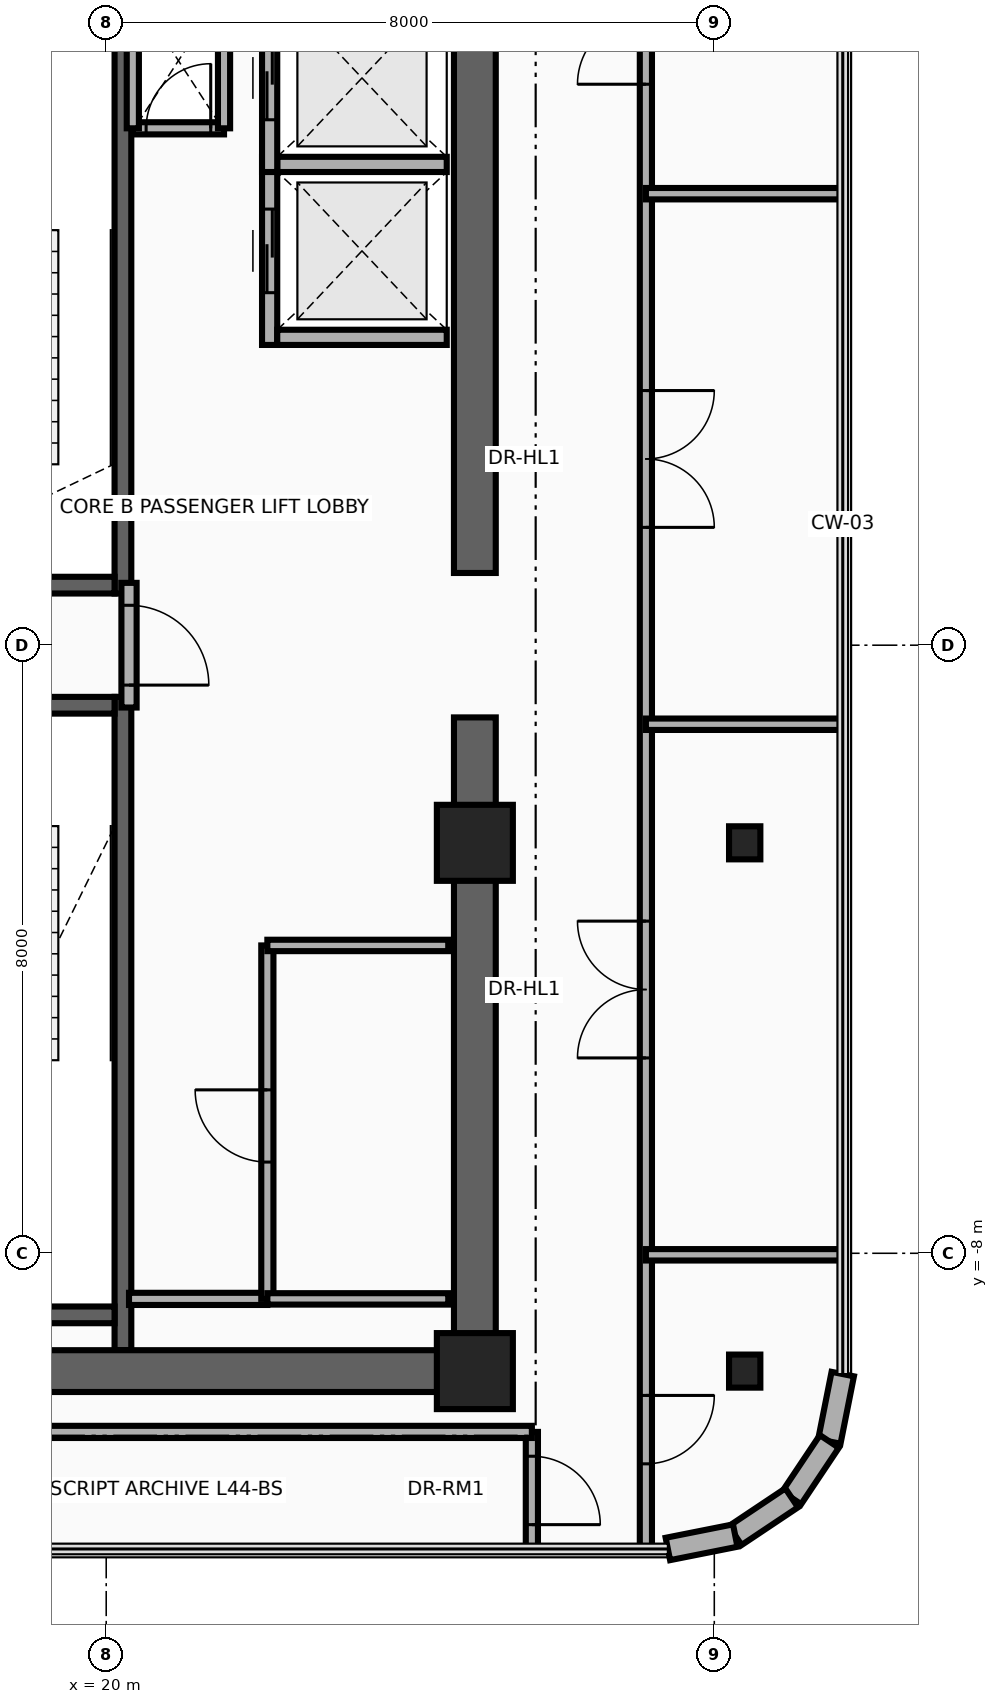
"""IFC4 building model, lengths in metres.
Left out: names, types, materials, properties, quantities, classifications, styles, units other than length and angle.
Written with IfcOpenShell. Run it as: python <this file> out.ifc"""

import sys

from ifc_helpers import new_model, si_unit, direction, frame, frame_2d, origin, origin_2d, place, context, subcontext, project, spatial, rectangle, i_section, extrude, source, transform, mapped, element, fill, save


model = new_model("IFC4")
c1 = context("Model", 3, precision=1e-05, world=origin(), true_north=direction((0.0, 1.0)))
c2 = subcontext(c1, "Body", "Model", "MODEL_VIEW")
j1 = project(units=[si_unit("LENGTHUNIT", "METRE"), si_unit("PLANEANGLEUNIT", "RADIAN")], contexts=[c1])
p1 = place(None, origin())
s1 = spatial("IfcSite", under=j1, at=p1, CompositionType="ELEMENT")
p2 = place(p1, origin())
s2 = spatial("IfcBuilding", under=s1, at=p2, CompositionType="ELEMENT")
p3 = place(p2, frame((0.0, 0.0, 172.3)))
s3 = spatial("IfcBuildingStorey", under=s2, at=p3, CompositionType="ELEMENT", Elevation=172.3)
p4 = place(p3, frame((20.22, 0.68, 0.0), z_axis=(0.0, 0.0, 1.0), x_axis=(0.0, 1.0, 0.0)))
e1 = element("IfcWall", 1, at=p4, inside=s3, PredefinedType="SHEAR", context=c2, shape_type="SweptSolid", body=[
    extrude(rectangle(XDim=8.595, YDim=0.22, at=frame_2d((4.297, 0.0))), origin(), (0.0, 0.0, 1.0), 3.93),
])
p5 = place(p3, frame((17.0, 0.79, 0.0), z_axis=(0.0, 0.0, 1.0), x_axis=(1.0, 0.0, 0.0)))
e2 = element("IfcWall", 2, at=p5, inside=s3, PredefinedType="SHEAR", context=c2, shape_type="SweptSolid", body=[
    extrude(rectangle(XDim=3.11, YDim=0.22, at=frame_2d((1.555, 0.0))), origin(), (0.0, 0.0, 1.0), 3.93),
])
p6 = place(p5, frame((0.95, 0.0, 0.0)))
e3 = element("IfcOpeningElement", 3, at=p6, cuts=e2, PredefinedType="OPENING", context=c2, shape_type="SweptSolid", body=[
    extrude(rectangle(XDim=1.1, YDim=2.15, at=frame_2d((0.55, 1.075))), frame((0.0, 0.125, 0.0), z_axis=(0.0, -1.0, 0.0), x_axis=(1.0, 0.0, 0.0)), (0.0, 0.0, 1.0), 0.25),
])
p7 = place(p3, frame((20.22, -9.275, 0.0), z_axis=(0.0, 0.0, 1.0), x_axis=(0.0, 1.0, 0.0)))
e4 = element("IfcWall", 4, at=p7, inside=s3, PredefinedType="SHEAR", context=c2, shape_type="SweptSolid", body=[
    extrude(rectangle(XDim=8.595, YDim=0.22, at=frame_2d((4.297, 0.0))), origin(), (0.0, 0.0, 1.0), 3.93),
])
p8 = place(p3, frame((17.0, -8.81, 0.0), z_axis=(0.0, 0.0, 1.0), x_axis=(1.0, 0.0, 0.0)))
e5 = element("IfcWall", 5, at=p8, inside=s3, PredefinedType="SHEAR", context=c2, shape_type="SweptSolid", body=[
    extrude(rectangle(XDim=3.11, YDim=0.22, at=frame_2d((1.555, 0.0))), origin(), (0.0, 0.0, 1.0), 3.93),
])
p9 = place(p3, frame((17.0, -0.79, 0.0), z_axis=(0.0, 0.0, 1.0), x_axis=(1.0, 0.0, 0.0)))
e6 = element("IfcWall", 6, at=p9, inside=s3, PredefinedType="SHEAR", context=c2, shape_type="SweptSolid", body=[
    extrude(rectangle(XDim=3.11, YDim=0.22, at=frame_2d((1.555, 0.0))), origin(), (0.0, 0.0, 1.0), 3.93),
])
p10 = place(p9, frame((0.95, 0.0, 0.0)))
e7 = element("IfcOpeningElement", 7, at=p10, cuts=e6, PredefinedType="OPENING", context=c2, shape_type="SweptSolid", body=[
    extrude(rectangle(XDim=1.1, YDim=2.15, at=frame_2d((0.55, 1.075))), frame((0.0, 0.125, 0.0), z_axis=(0.0, -1.0, 0.0), x_axis=(1.0, 0.0, 0.0)), (0.0, 0.0, 1.0), 0.25),
])
for number, where, z_axis, x_axis in (
    (8, (24.85, -9.825, 0.0), (0.0, 0.0, 1.0), (0.0, 1.0, 0.0)),
    (9, (24.85, 0.95, 0.0), (0.0, 0.0, 1.0), (0.0, 1.0, 0.0)),
):
    element("IfcWall", number, at=place(p3, frame(where, z_axis=z_axis, x_axis=x_axis)), inside=s3, PredefinedType="SHEAR", context=c2, shape_type="SweptSolid", body=[
        extrude(rectangle(XDim=8.875, YDim=0.55, at=frame_2d((4.438, 0.0))), origin(), (0.0, 0.0, 1.0), 3.93),
    ])
p11 = place(p3, frame((15.85, -9.55, 0.0), z_axis=(0.0, 0.0, 1.0), x_axis=(1.0, 0.0, 0.0)))
e10 = element("IfcWall", 10, at=p11, inside=s3, PredefinedType="SHEAR", context=c2, shape_type="SweptSolid", body=[
    extrude(rectangle(XDim=9.0, YDim=0.55, at=frame_2d((4.5, 0.0))), origin(), (0.0, 0.0, 1.0), 3.93),
])
m1 = source(origin(), c2, "Body", "SweptSolid", [
    extrude(rectangle(XDim=1.0, YDim=1.0, at=origin_2d()), origin(), (0.0, 0.0, 1.0), 4.25),
])
p12 = place(p3, frame((24.85, -9.55, 0.0), z_axis=(0.0, 0.0, 1.0), x_axis=(1.0, 0.0, 0.0)))
e11 = element("IfcColumn", 11, at=p12, inside=s3, PredefinedType="COLUMN", context=c2, shape_type="MappedRepresentation", body=[
    mapped(m1, transform((0.0, 0.0, 0.0), x_axis=(1.0, 0.0, 0.0), y_axis=(0.0, 1.0, 0.0), z_axis=(0.0, 0.0, 1.0), scale=1.0)),
])
m2 = source(origin(), c2, "Body", "SweptSolid", [
    extrude(i_section(OverallWidth=0.412, OverallDepth=0.435, WebThickness=0.036, FlangeThickness=0.057, at=origin_2d()), origin(), (0.0, 0.0, 1.0), 4.25),
])
p13 = place(p3, frame((28.4, -9.55, 0.0), z_axis=(0.0, 0.0, 1.0), x_axis=(1.0, 0.0, 0.0)))
e12 = element("IfcColumn", 12, at=p13, inside=s3, PredefinedType="COLUMN", context=c2, shape_type="MappedRepresentation", body=[
    mapped(m2, transform((0.0, 0.0, 0.0), x_axis=(1.0, 0.0, 0.0), y_axis=(0.0, 1.0, 0.0), z_axis=(0.0, 0.0, 1.0), scale=1.0)),
])
p14 = place(p3, frame((24.85, -2.6, 0.0), z_axis=(0.0, 0.0, 1.0), x_axis=(1.0, 0.0, 0.0)))
e13 = element("IfcColumn", 13, at=p14, inside=s3, PredefinedType="COLUMN", context=c2, shape_type="MappedRepresentation", body=[
    mapped(m1, transform((0.0, 0.0, 0.0), x_axis=(1.0, 0.0, 0.0), y_axis=(0.0, 1.0, 0.0), z_axis=(0.0, 0.0, 1.0), scale=1.0)),
])
p15 = place(p3, frame((28.4, -2.6, 0.0), z_axis=(0.0, 0.0, 1.0), x_axis=(1.0, 0.0, 0.0)))
e14 = element("IfcColumn", 14, at=p15, inside=s3, PredefinedType="COLUMN", context=c2, shape_type="MappedRepresentation", body=[
    mapped(m2, transform((0.0, 0.0, 0.0), x_axis=(1.0, 0.0, 0.0), y_axis=(0.0, 1.0, 0.0), z_axis=(0.0, 0.0, 1.0), scale=1.0)),
])
p16 = place(p3, frame((29.69, -9.589, 0.0), z_axis=(0.0, 0.0, 1.0), x_axis=(-0.195025152871, -0.980798241101, 0.0)))
e15 = element("IfcWall", 15, at=p16, inside=s3, PredefinedType="SOLIDWALL", context=c2, shape_type="SweptSolid", body=[
    extrude(rectangle(XDim=0.904, YDim=0.3, at=frame_2d((0.452, 0.0))), origin(), (0.0, 0.0, 1.0), 3.93),
])
p17 = place(p3, frame((29.514, -10.476, 0.0), z_axis=(0.0, 0.0, 1.0), x_axis=(-0.555520488502, -0.831502848374, 0.0)))
e16 = element("IfcWall", 16, at=p17, inside=s3, PredefinedType="SOLIDWALL", context=c2, shape_type="SweptSolid", body=[
    extrude(rectangle(XDim=0.893, YDim=0.3, at=frame_2d((0.446, 0.0))), origin(), (0.0, 0.0, 1.0), 3.93),
])
p18 = place(p3, frame((29.018, -11.218, 0.0), z_axis=(0.0, 0.0, 1.0), x_axis=(-0.83158722889, -0.555394167009, 0.0)))
e17 = element("IfcWall", 17, at=p18, inside=s3, PredefinedType="SOLIDWALL", context=c2, shape_type="SweptSolid", body=[
    extrude(rectangle(XDim=0.893, YDim=0.3, at=frame_2d((0.446, 0.0))), origin(), (0.0, 0.0, 1.0), 3.93),
])
p19 = place(p3, frame((28.275, -11.714, 0.0), z_axis=(0.0, 0.0, 1.0), x_axis=(-0.980787963133, -0.19507683454, 0.0)))
e18 = element("IfcWall", 18, at=p19, inside=s3, PredefinedType="SOLIDWALL", context=c2, shape_type="SweptSolid", body=[
    extrude(rectangle(XDim=0.904, YDim=0.3, at=frame_2d((0.452, 0.0))), origin(), (0.0, 0.0, 1.0), 3.93),
])
p20 = place(p3, frame((22.15, 3.95, 0.0), z_axis=(0.0, 0.0, 1.0), x_axis=(0.0, 1.0, 0.0)))
e19 = element("IfcWall", 19, at=p20, inside=s3, PredefinedType="MOVABLE", context=c2, shape_type="SweptSolid", body=[
    extrude(rectangle(XDim=2.475, YDim=0.2, at=frame_2d((1.238, 0.0))), origin(), (0.0, 0.0, 1.0), 3.93),
])
p21 = place(p20, frame((0.688, 0.0, 0.0)))
e20 = element("IfcOpeningElement", 20, at=p21, cuts=e19, PredefinedType="OPENING", context=c2, shape_type="SweptSolid", body=[
    extrude(rectangle(XDim=1.1, YDim=2.1, at=frame_2d((0.55, 1.05))), frame((0.0, 0.115, 0.0), z_axis=(0.0, -1.0, 0.0), x_axis=(1.0, 0.0, 0.0)), (0.0, 0.0, 1.0), 0.23),
])
for number, where, z_axis, x_axis in (
    (21, (22.25, 4.05, 0.0), (0.0, 0.0, 1.0), (1.0, 0.0, 0.0)),
    (22, (22.25, 6.325, 0.0), (0.0, 0.0, 1.0), (1.0, 0.0, 0.0)),
):
    element("IfcWall", number, at=place(p3, frame(where, z_axis=z_axis, x_axis=x_axis)), inside=s3, PredefinedType="MOVABLE", context=c2, shape_type="SweptSolid", body=[
        extrude(rectangle(XDim=2.23, YDim=0.2, at=frame_2d((1.115, 0.0))), origin(), (0.0, 0.0, 1.0), 3.93),
    ])
p22 = place(p3, frame((22.15, 6.225, 0.0), z_axis=(0.0, 0.0, 1.0), x_axis=(0.0, 1.0, 0.0)))
e23 = element("IfcWall", 23, at=p22, inside=s3, PredefinedType="MOVABLE", context=c2, shape_type="SweptSolid", body=[
    extrude(rectangle(XDim=2.475, YDim=0.2, at=frame_2d((1.237, 0.0))), origin(), (0.0, 0.0, 1.0), 3.93),
])
p23 = place(p22, frame((0.688, 0.0, 0.0)))
e24 = element("IfcOpeningElement", 24, at=p23, cuts=e23, PredefinedType="OPENING", context=c2, shape_type="SweptSolid", body=[
    extrude(rectangle(XDim=1.1, YDim=2.1, at=frame_2d((0.55, 1.05))), frame((0.0, 0.115, 0.0), z_axis=(0.0, -1.0, 0.0), x_axis=(1.0, 0.0, 0.0)), (0.0, 0.0, 1.0), 0.23),
])
p24 = place(p3, frame((20.3, -0.82, 0.0), z_axis=(0.0, 0.0, 1.0), x_axis=(0.0, 1.0, 0.0)))
e25 = element("IfcWall", 25, at=p24, inside=s3, PredefinedType="PARTITIONING", context=c2, shape_type="SweptSolid", body=[
    extrude(rectangle(XDim=1.64, YDim=0.2, at=frame_2d((0.82, 0.0))), origin(), (0.0, 0.0, 1.0), 3.93),
])
p25 = place(p24, frame((0.295, 0.0, 0.0)))
e26 = element("IfcOpeningElement", 26, at=p25, cuts=e25, PredefinedType="OPENING", context=c2, shape_type="SweptSolid", body=[
    extrude(rectangle(XDim=1.05, YDim=2.15, at=frame_2d((0.525, 1.075))), frame((0.0, 0.115, 0.0), z_axis=(0.0, -1.0, 0.0), x_axis=(1.0, 0.0, 0.0)), (0.0, 0.0, 1.0), 0.23),
])
p26 = place(p3, frame((20.35, 6.8, 0.0), z_axis=(0.0, 0.0, 1.0), x_axis=(1.0, 0.0, 0.0)))
e27 = element("IfcWall", 27, at=p26, inside=s3, PredefinedType="PARTITIONING", context=c2, shape_type="SweptSolid", body=[
    extrude(rectangle(XDim=1.2, YDim=0.16, at=frame_2d((0.6, 0.0))), origin(), (0.0, 0.0, 1.0), 3.93),
])
p27 = place(p26, frame((0.175, 0.0, 0.0)))
e28 = element("IfcOpeningElement", 28, at=p27, cuts=e27, PredefinedType="OPENING", context=c2, shape_type="SweptSolid", body=[
    extrude(rectangle(XDim=0.85, YDim=2.05, at=frame_2d((0.425, 1.025))), frame((0.0, 0.095, 0.0), z_axis=(0.0, -1.0, 0.0), x_axis=(1.0, 0.0, 0.0)), (0.0, 0.0, 1.0), 0.19),
])
for number, where, z_axis, x_axis in (
    (29, (21.55, 6.8, 0.0), (0.0, 0.0, 1.0), (0.0, 1.0, 0.0)),
    (30, (20.35, 6.8, 0.0), (0.0, 0.0, 1.0), (0.0, 1.0, 0.0)),
):
    element("IfcWall", number, at=place(p3, frame(where, z_axis=z_axis, x_axis=x_axis)), inside=s3, PredefinedType="PARTITIONING", context=c2, shape_type="SweptSolid", body=[
        extrude(rectangle(XDim=1.8, YDim=0.16, at=frame_2d((0.9, 0.0))), origin(), (0.0, 0.0, 1.0), 3.93),
    ])
p28 = place(p3, frame((20.3, -8.6, 0.0), z_axis=(0.0, 0.0, 1.0), x_axis=(1.0, 0.0, 0.0)))
e31 = element("IfcWall", 31, at=p28, inside=s3, PredefinedType="PARTITIONING", context=c2, shape_type="SweptSolid", body=[
    extrude(rectangle(XDim=1.82, YDim=0.16, at=frame_2d((0.91, 0.0))), origin(), (0.0, 0.0, 1.0), 3.93),
])
p29 = place(p3, frame((22.12, -8.6, 0.0), z_axis=(0.0, 0.0, 1.0), x_axis=(0.0, 1.0, 0.0)))
e32 = element("IfcWall", 32, at=p29, inside=s3, PredefinedType="PARTITIONING", context=c2, shape_type="SweptSolid", body=[
    extrude(rectangle(XDim=4.65, YDim=0.16, at=frame_2d((2.325, 0.0))), origin(), (0.0, 0.0, 1.0), 3.93),
])
p30 = place(p29, frame((1.8, 0.0, 0.0)))
e33 = element("IfcOpeningElement", 33, at=p30, cuts=e32, PredefinedType="OPENING", context=c2, shape_type="SweptSolid", body=[
    extrude(rectangle(XDim=0.95, YDim=2.15, at=frame_2d((0.475, 1.075))), frame((0.0, 0.095, 0.0), z_axis=(0.0, -1.0, 0.0), x_axis=(1.0, 0.0, 0.0)), (0.0, 0.0, 1.0), 0.19),
])
for number, where, z_axis, x_axis in (
    (34, (22.12, -3.95, 0.0), (0.0, 0.0, 1.0), (1.0, 0.0, 0.0)),
    (35, (22.12, -8.6, 0.0), (0.0, 0.0, 1.0), (1.0, 0.0, 0.0)),
):
    element("IfcWall", number, at=place(p3, frame(where, z_axis=z_axis, x_axis=x_axis)), inside=s3, PredefinedType="PARTITIONING", context=c2, shape_type="SweptSolid", body=[
        extrude(rectangle(XDim=2.38, YDim=0.15, at=frame_2d((1.19, 0.0))), origin(), (0.0, 0.0, 1.0), 3.93),
    ])
p31 = place(p3, frame((25.6, -11.89, 0.0), z_axis=(0.0, 0.0, 1.0), x_axis=(0.0, 1.0, 0.0)))
e36 = element("IfcWall", 36, at=p31, inside=s3, PredefinedType="PARTITIONING", context=c2, shape_type="SweptSolid", body=[
    extrude(rectangle(XDim=1.54, YDim=0.16, at=frame_2d((0.77, 0.0))), origin(), (0.0, 0.0, 1.0), 3.93),
])
p32 = place(p31, frame((0.32, 0.0, 0.0)))
e37 = element("IfcOpeningElement", 37, at=p32, cuts=e36, PredefinedType="OPENING", context=c2, shape_type="SweptSolid", body=[
    extrude(rectangle(XDim=0.9, YDim=2.1, at=frame_2d((0.45, 1.05))), frame((0.0, 0.095, 0.0), z_axis=(0.0, -1.0, 0.0), x_axis=(1.0, 0.0, 0.0)), (0.0, 0.0, 1.0), 0.19),
])
p33 = place(p3, frame((13.889, -10.35, 0.0), z_axis=(0.0, 0.0, 1.0), x_axis=(1.0, 0.0, 0.0)))
e38 = element("IfcWall", 38, at=p33, inside=s3, PredefinedType="PARTITIONING", context=c2, shape_type="SweptSolid", body=[
    extrude(rectangle(XDim=11.711, YDim=0.16, at=frame_2d((5.855, 0.0))), origin(), (0.0, 0.0, 1.0), 3.93),
])
p34 = place(p3, frame((27.1, -11.89, 0.0), z_axis=(0.0, 0.0, 1.0), x_axis=(0.0, 1.0, 0.0)))
e39 = element("IfcWall", 39, at=p34, inside=s3, PredefinedType="PARTITIONING", context=c2, shape_type="SweptSolid", body=[
    extrude(rectangle(XDim=24.81, YDim=0.16, at=frame_2d((12.405, 0.0))), origin(), (0.0, 0.0, 1.0), 2.965),
])
p35 = place(p34, frame((1.12, 0.0, 0.0)))
e40 = element("IfcOpeningElement", 40, at=p35, cuts=e39, PredefinedType="OPENING", context=c2, shape_type="SweptSolid", body=[
    extrude(rectangle(XDim=0.9, YDim=2.1, at=frame_2d((0.45, 1.05))), frame((0.0, 0.095, 0.0), z_axis=(0.0, -1.0, 0.0), x_axis=(1.0, 0.0, 0.0)), (0.0, 0.0, 1.0), 0.19),
])
p36 = place(p34, frame((6.46, 0.0, 0.0)))
e41 = element("IfcOpeningElement", 41, at=p36, cuts=e39, PredefinedType="OPENING", context=c2, shape_type="SweptSolid", body=[
    extrude(rectangle(XDim=1.8, YDim=2.15, at=frame_2d((0.9, 1.075))), frame((0.0, 0.095, 0.0), z_axis=(0.0, -1.0, 0.0), x_axis=(1.0, 0.0, 0.0)), (0.0, 0.0, 1.0), 0.19),
])
p37 = place(p34, frame((13.44, 0.0, 0.0)))
e42 = element("IfcOpeningElement", 42, at=p37, cuts=e39, PredefinedType="OPENING", context=c2, shape_type="SweptSolid", body=[
    extrude(rectangle(XDim=1.8, YDim=2.15, at=frame_2d((0.9, 1.075))), frame((0.0, 0.095, 0.0), z_axis=(0.0, -1.0, 0.0), x_axis=(1.0, 0.0, 0.0)), (0.0, 0.0, 1.0), 0.19),
])
p38 = place(p34, frame((19.27, 0.0, 0.0)))
e43 = element("IfcOpeningElement", 43, at=p38, cuts=e39, PredefinedType="OPENING", context=c2, shape_type="SweptSolid", body=[
    extrude(rectangle(XDim=1.8, YDim=2.15, at=frame_2d((0.9, 1.075))), frame((0.0, 0.095, 0.0), z_axis=(0.0, -1.0, 0.0), x_axis=(1.0, 0.0, 0.0)), (0.0, 0.0, 1.0), 0.19),
])
for number, where, z_axis, x_axis in (
    (44, (27.1, -8.02, 0.0), (0.0, 0.0, 1.0), (1.0, 0.0, 0.0)),
    (45, (27.1, -1.04, 0.0), (0.0, 0.0, 1.0), (1.0, 0.0, 0.0)),
    (46, (27.1, 5.94, 0.0), (0.0, 0.0, 1.0), (1.0, 0.0, 0.0)),
):
    element("IfcWall", number, at=place(p3, frame(where, z_axis=z_axis, x_axis=x_axis)), inside=s3, PredefinedType="PARTITIONING", context=c2, shape_type="SweptSolid", body=[
        extrude(rectangle(XDim=2.59, YDim=0.15, at=frame_2d((1.295, 0.0))), origin(), (0.0, 0.0, 1.0), 3.376),
    ])
p39 = place(p21, origin())
e47 = element("IfcDoor", 47, at=p39, inside=s3, OperationType="DOUBLE_DOOR_SLIDING", PredefinedType="DOOR", context=c2, shape_type="SweptSolid", body=[
    extrude(rectangle(XDim=1.1, YDim=2.1, at=frame_2d((0.55, 1.05))), frame((0.0, 0.025, 0.0), z_axis=(0.0, -1.0, 0.0), x_axis=(1.0, 0.0, 0.0)), (0.0, 0.0, 1.0), 0.05),
])
fill(e20, e47)
p40 = place(p23, origin())
e48 = element("IfcDoor", 48, at=p40, inside=s3, OperationType="DOUBLE_DOOR_SLIDING", PredefinedType="DOOR", context=c2, shape_type="SweptSolid", body=[
    extrude(rectangle(XDim=1.1, YDim=2.1, at=frame_2d((0.55, 1.05))), frame((0.0, 0.025, 0.0), z_axis=(0.0, -1.0, 0.0), x_axis=(1.0, 0.0, 0.0)), (0.0, 0.0, 1.0), 0.05),
])
fill(e24, e48)
p41 = place(p25, frame((1.05, 0.0, 0.0), z_axis=(0.0, 0.0, 1.0), x_axis=(-1.0, 0.0, 0.0)))
e49 = element("IfcDoor", 49, at=p41, inside=s3, OperationType="SINGLE_SWING_LEFT", PredefinedType="DOOR", context=c2, shape_type="SweptSolid", body=[
    extrude(rectangle(XDim=1.05, YDim=2.15, at=frame_2d((0.525, 1.075))), frame((0.0, 0.025, 0.0), z_axis=(0.0, -1.0, 0.0), x_axis=(1.0, 0.0, 0.0)), (0.0, 0.0, 1.0), 0.05),
])
fill(e26, e49)
p42 = place(p27, origin())
e50 = element("IfcDoor", 50, at=p42, inside=s3, OperationType="SINGLE_SWING_RIGHT", PredefinedType="DOOR", context=c2, shape_type="SweptSolid", body=[
    extrude(rectangle(XDim=0.85, YDim=2.05, at=frame_2d((0.425, 1.025))), frame((0.0, 0.025, 0.0), z_axis=(0.0, -1.0, 0.0), x_axis=(1.0, 0.0, 0.0)), (0.0, 0.0, 1.0), 0.05),
])
fill(e28, e50)
p43 = place(p30, origin())
e51 = element("IfcDoor", 51, at=p43, inside=s3, OperationType="SINGLE_SWING_LEFT", PredefinedType="DOOR", context=c2, shape_type="SweptSolid", body=[
    extrude(rectangle(XDim=0.95, YDim=2.15, at=frame_2d((0.475, 1.075))), frame((0.0, 0.025, 0.0), z_axis=(0.0, -1.0, 0.0), x_axis=(1.0, 0.0, 0.0)), (0.0, 0.0, 1.0), 0.05),
])
fill(e33, e51)
p44 = place(p32, frame((0.9, 0.0, 0.0), z_axis=(0.0, 0.0, 1.0), x_axis=(-1.0, 0.0, 0.0)))
e52 = element("IfcDoor", 52, at=p44, inside=s3, OperationType="SINGLE_SWING_LEFT", PredefinedType="DOOR", context=c2, shape_type="SweptSolid", body=[
    extrude(rectangle(XDim=0.9, YDim=2.1, at=frame_2d((0.45, 1.05))), frame((0.0, 0.025, 0.0), z_axis=(0.0, -1.0, 0.0), x_axis=(1.0, 0.0, 0.0)), (0.0, 0.0, 1.0), 0.05),
])
fill(e37, e52)
p45 = place(p35, frame((0.9, 0.0, 0.0), z_axis=(0.0, 0.0, 1.0), x_axis=(-1.0, 0.0, 0.0)))
e53 = element("IfcDoor", 53, at=p45, inside=s3, OperationType="SINGLE_SWING_LEFT", PredefinedType="DOOR", context=c2, shape_type="SweptSolid", body=[
    extrude(rectangle(XDim=0.9, YDim=2.1, at=frame_2d((0.45, 1.05))), frame((0.0, 0.025, 0.0), z_axis=(0.0, -1.0, 0.0), x_axis=(1.0, 0.0, 0.0)), (0.0, 0.0, 1.0), 0.05),
])
fill(e40, e53)
p46 = place(p36, origin())
e54 = element("IfcDoor", 54, at=p46, inside=s3, OperationType="DOUBLE_DOOR_SINGLE_SWING", PredefinedType="DOOR", context=c2, shape_type="SweptSolid", body=[
    extrude(rectangle(XDim=1.8, YDim=2.15, at=frame_2d((0.9, 1.075))), frame((0.0, 0.025, 0.0), z_axis=(0.0, -1.0, 0.0), x_axis=(1.0, 0.0, 0.0)), (0.0, 0.0, 1.0), 0.05),
])
fill(e41, e54)
p47 = place(p37, frame((1.8, 0.0, 0.0), z_axis=(0.0, 0.0, 1.0), x_axis=(-1.0, 0.0, 0.0)))
e55 = element("IfcDoor", 55, at=p47, inside=s3, OperationType="DOUBLE_DOOR_SINGLE_SWING", PredefinedType="DOOR", context=c2, shape_type="SweptSolid", body=[
    extrude(rectangle(XDim=1.8, YDim=2.15, at=frame_2d((0.9, 1.075))), frame((0.0, 0.025, 0.0), z_axis=(0.0, -1.0, 0.0), x_axis=(1.0, 0.0, 0.0)), (0.0, 0.0, 1.0), 0.05),
])
fill(e42, e55)
p48 = place(p38, origin())
e56 = element("IfcDoor", 56, at=p48, inside=s3, OperationType="DOUBLE_DOOR_SINGLE_SWING", PredefinedType="DOOR", context=c2, shape_type="SweptSolid", body=[
    extrude(rectangle(XDim=1.8, YDim=2.15, at=frame_2d((0.9, 1.075))), frame((0.0, 0.025, 0.0), z_axis=(0.0, -1.0, 0.0), x_axis=(1.0, 0.0, 0.0)), (0.0, 0.0, 1.0), 0.05),
])
fill(e43, e56)
save(model, sys.argv[1])
